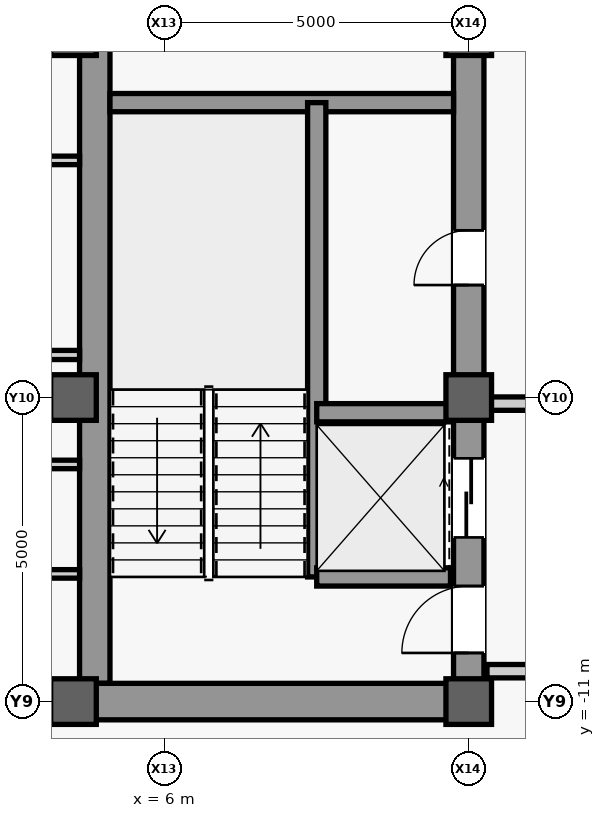
"""IFC4 building model, lengths in metres.
Left out: names, types, materials, properties, quantities, classifications, styles, units other than length and angle.
Written with IfcOpenShell. Run it as: python <this file> out.ifc"""

import sys

from ifc_helpers import new_model, si_unit, direction, frame, frame_2d, origin, origin_2d, place, context, subcontext, project, spatial, rectangle, extrude, source, transform, mapped, element, fill, save


model = new_model("IFC4")
c1 = context("Model", 3, precision=1e-05, world=origin(), true_north=direction((0.0, 1.0)))
c2 = subcontext(c1, "Body", "Model", "MODEL_VIEW")
j1 = project(units=[si_unit("LENGTHUNIT", "METRE"), si_unit("PLANEANGLEUNIT", "RADIAN")], contexts=[c1])
p1 = place(None, origin())
s1 = spatial("IfcSite", under=j1, at=p1, CompositionType="ELEMENT")
p2 = place(p1, origin())
s2 = spatial("IfcBuilding", under=s1, at=p2, CompositionType="ELEMENT")
p3 = place(p2, frame((0.0, 0.0, 317.5)))
s3 = spatial("IfcBuildingStorey", under=s2, at=p3, CompositionType="ELEMENT", Elevation=317.5)
m1 = source(origin(), c2, "Body", "SweptSolid", [
    extrude(rectangle(XDim=22.0, YDim=0.5, at=frame_2d((11.0, 0.0))), origin(), (0.0, 0.0, 1.0), 3.78),
])
p4 = place(p3, frame((11.0, -11.0, 0.0), z_axis=(0.0, 0.0, 1.0), x_axis=(0.0, 1.0, 0.0)))
e1 = element("IfcWall", 1, at=p4, inside=s3, PredefinedType="SHEAR", context=c2, shape_type="MappedRepresentation", body=[
    mapped(m1, transform((0.0, 0.0, 0.0), scale=1.0)),
])
m2 = source(origin(), c2, "Body", "SweptSolid", [
    extrude(rectangle(XDim=1.1, YDim=2.2, at=frame_2d((0.55, 1.1))), frame((0.0, 0.26, 0.0), z_axis=(0.0, -1.0, 0.0), x_axis=(1.0, 0.0, 0.0)), (0.0, 0.0, 1.0), 0.52),
])
p5 = place(p4, frame((0.8, 0.0, 0.0)))
e2 = element("IfcOpeningElement", 2, at=p5, cuts=e1, PredefinedType="OPENING", context=c2, shape_type="MappedRepresentation", body=[
    mapped(m2, transform((0.0, 0.0, 0.0), scale=1.0)),
])
m3 = source(origin(), c2, "Body", "SweptSolid", [
    extrude(rectangle(XDim=0.9, YDim=2.15, at=frame_2d((0.45, 1.075))), frame((0.0, 0.26, 0.0), z_axis=(0.0, -1.0, 0.0), x_axis=(1.0, 0.0, 0.0)), (0.0, 0.0, 1.0), 0.52),
])
p6 = place(p4, frame((6.85, 0.0, 0.0)))
e3 = element("IfcOpeningElement", 3, at=p6, cuts=e1, PredefinedType="OPENING", context=c2, shape_type="MappedRepresentation", body=[
    mapped(m3, transform((0.0, 0.0, 0.0), scale=1.0)),
])
m4 = source(origin(), c2, "Body", "SweptSolid", [
    extrude(rectangle(XDim=1.2, YDim=2.3, at=frame_2d((0.6, 1.15))), frame((0.0, 0.26, 0.0), z_axis=(0.0, -1.0, 0.0), x_axis=(1.0, 0.0, 0.0)), (0.0, 0.0, 1.0), 0.52),
])
p7 = place(p4, frame((17.6, 0.0, 0.0)))
e4 = element("IfcOpeningElement", 4, at=p7, cuts=e1, PredefinedType="OPENING", context=c2, shape_type="MappedRepresentation", body=[
    mapped(m4, transform((0.0, 0.0, 0.0), scale=1.0)),
])
p8 = place(p4, frame((19.6, 0.0, 0.0)))
e5 = element("IfcOpeningElement", 5, at=p8, cuts=e1, PredefinedType="OPENING", context=c2, shape_type="MappedRepresentation", body=[
    mapped(m4, transform((0.0, 0.0, 0.0), scale=1.0)),
])
m5 = source(origin(), c2, "Body", "SweptSolid", [
    extrude(rectangle(XDim=1.3, YDim=2.3, at=frame_2d((0.65, 1.15))), frame((0.0, 0.26, 0.0), z_axis=(0.0, -1.0, 0.0), x_axis=(1.0, 0.0, 0.0)), (0.0, 0.0, 1.0), 0.52),
])
p9 = place(p4, frame((2.7, 0.0, 0.0)))
e6 = element("IfcOpeningElement", 6, at=p9, cuts=e1, PredefinedType="OPENING", context=c2, shape_type="MappedRepresentation", body=[
    mapped(m5, transform((0.0, 0.0, 0.0), scale=1.0)),
])
p10 = place(p4, frame((13.35, 0.0, 0.0)))
e7 = element("IfcOpeningElement", 7, at=p10, cuts=e1, PredefinedType="OPENING", context=c2, shape_type="MappedRepresentation", body=[
    mapped(m5, transform((0.0, 0.0, 0.0), scale=1.0)),
])
m6 = source(origin(), c2, "Body", "SweptSolid", [
    extrude(rectangle(XDim=21.4, YDim=0.5, at=frame_2d((10.7, 0.0))), origin(), (0.0, 0.0, 1.0), 3.78),
])
p11 = place(p3, frame((4.85, -10.7, 0.0), z_axis=(0.0, 0.0, 1.0), x_axis=(0.0, 1.0, 0.0)))
e8 = element("IfcWall", 8, at=p11, inside=s3, PredefinedType="SHEAR", context=c2, shape_type="MappedRepresentation", body=[
    mapped(m6, transform((0.0, 0.0, 0.0), scale=1.0)),
])
m7 = source(origin(), c2, "Body", "SweptSolid", [
    extrude(rectangle(XDim=5.9, YDim=0.6, at=frame_2d((2.95, 0.0))), origin(), (0.0, 0.0, 1.0), 3.78),
])
p12 = place(p3, frame((4.85, -11.0, 0.0), z_axis=(0.0, 0.0, 1.0), x_axis=(1.0, 0.0, 0.0)))
e9 = element("IfcWall", 9, at=p12, inside=s3, PredefinedType="SHEAR", context=c2, shape_type="MappedRepresentation", body=[
    mapped(m7, transform((0.0, 0.0, 0.0), scale=1.0)),
])
m8 = source(origin(), c2, "Body", "SweptSolid", [
    extrude(rectangle(XDim=5.65, YDim=0.3, at=frame_2d((2.825, 0.0))), origin(), (0.0, 0.0, 1.0), 3.78),
])
p13 = place(p3, frame((5.1, -1.15, 0.0), z_axis=(0.0, 0.0, 1.0), x_axis=(1.0, 0.0, 0.0)))
e10 = element("IfcWall", 10, at=p13, inside=s3, PredefinedType="SHEAR", context=c2, shape_type="MappedRepresentation", body=[
    mapped(m8, transform((0.0, 0.0, 0.0), scale=1.0)),
])
m9 = source(origin(), c2, "Body", "SweptSolid", [
    extrude(rectangle(XDim=9.2, YDim=0.5, at=frame_2d((4.6, 0.0))), origin(), (0.0, 0.0, 1.0), 3.78),
])
p14 = place(p3, frame((-4.6, -11.0, 0.0), z_axis=(0.0, 0.0, 1.0), x_axis=(1.0, 0.0, 0.0)))
e11 = element("IfcWall", 11, at=p14, inside=s3, PredefinedType="SHEAR", context=c2, shape_type="MappedRepresentation", body=[
    mapped(m9, transform((0.0, 0.0, 0.0), scale=1.0)),
])
m10 = source(origin(), c2, "Body", "SweptSolid", [
    extrude(rectangle(XDim=1.8, YDim=2.25, at=frame_2d((0.9, 1.125))), frame((0.0, 0.26, 0.0), z_axis=(0.0, -1.0, 0.0), x_axis=(1.0, 0.0, 0.0)), (0.0, 0.0, 1.0), 0.52),
])
p15 = place(p14, frame((3.7, 0.0, 0.0)))
e12 = element("IfcOpeningElement", 12, at=p15, cuts=e11, PredefinedType="OPENING", context=c2, shape_type="MappedRepresentation", body=[
    mapped(m10, transform((0.0, 0.0, 0.0), scale=1.0)),
])
m11 = source(origin(), c2, "Body", "SweptSolid", [
    extrude(rectangle(XDim=0.75, YDim=0.75, at=origin_2d()), origin(), (0.0, 0.0, 1.0), 4.0),
])
for number, where, z_axis, x_axis in (
    (13, (4.5, -11.0, 0.0), (0.0, 0.0, 1.0), (1.0, 0.0, 0.0)),
    (14, (4.5, -6.0, 0.0), (0.0, 0.0, 1.0), (1.0, 0.0, 0.0)),
    (15, (4.5, 0.0, 0.0), (0.0, 0.0, 1.0), (1.0, 0.0, 0.0)),
    (16, (11.0, -11.0, 0.0), (0.0, 0.0, 1.0), (1.0, 0.0, 0.0)),
    (17, (11.0, -6.0, 0.0), (0.0, 0.0, 1.0), (1.0, 0.0, 0.0)),
    (18, (11.0, 0.0, 0.0), (0.0, 0.0, 1.0), (1.0, 0.0, 0.0)),
):
    element("IfcColumn", number, at=place(p3, frame(where, z_axis=z_axis, x_axis=x_axis)), inside=s3, PredefinedType="COLUMN", context=c2, shape_type="MappedRepresentation", body=[
        mapped(m11, transform((0.0, 0.0, 0.0), scale=1.0)),
    ])
m12 = source(origin(), c2, "Body", "SweptSolid", [
    extrude(rectangle(XDim=7.8, YDim=0.3, at=frame_2d((3.9, 0.0))), origin(), (0.0, 0.0, 1.0), 3.78),
])
p16 = place(p3, frame((8.5, -8.95, 0.0), z_axis=(0.0, 0.0, 1.0), x_axis=(0.0, 1.0, 0.0)))
e19 = element("IfcWall", 19, at=p16, inside=s3, PredefinedType="SHEAR", context=c2, shape_type="MappedRepresentation", body=[
    mapped(m12, transform((0.0, 0.0, 0.0), scale=1.0)),
])
m13 = source(origin(), c2, "Body", "SweptSolid", [
    extrude(rectangle(XDim=2.2, YDim=0.3, at=frame_2d((1.1, 0.0))), origin(), (0.0, 0.0, 1.0), 3.78),
])
for number, where, z_axis, x_axis in (
    (20, (8.5, -8.95, 0.0), (0.0, 0.0, 1.0), (1.0, 0.0, 0.0)),
    (21, (8.5, -6.25, 0.0), (0.0, 0.0, 1.0), (1.0, 0.0, 0.0)),
):
    element("IfcWall", number, at=place(p3, frame(where, z_axis=z_axis, x_axis=x_axis)), inside=s3, PredefinedType="SHEAR", context=c2, shape_type="MappedRepresentation", body=[
        mapped(m13, transform((0.0, 0.0, 0.0), scale=1.0)),
    ])
m14 = source(origin(), c2, "Body", "SweptSolid", [
    extrude(rectangle(XDim=4.05, YDim=0.22, at=frame_2d((2.025, 0.0))), origin(), (0.0, 0.0, 1.0), 3.78),
])
p17 = place(p3, frame((11.3, -10.5, 0.0), z_axis=(0.0, 0.0, 1.0), x_axis=(1.0, 0.0, 0.0)))
e22 = element("IfcWall", 22, at=p17, inside=s3, PredefinedType="PARTITIONING", context=c2, shape_type="MappedRepresentation", body=[
    mapped(m14, transform((0.0, 0.0, 0.0), scale=1.0)),
])
m15 = source(origin(), c2, "Body", "SweptSolid", [
    extrude(rectangle(XDim=4.05, YDim=0.22, at=frame_2d((2.025, 0.0))), origin(), (0.0, 0.0, 1.0), 3.085),
])
p18 = place(p3, frame((11.3, -6.1, 0.0), z_axis=(0.0, 0.0, 1.0), x_axis=(1.0, 0.0, 0.0)))
e23 = element("IfcWall", 23, at=p18, inside=s3, PredefinedType="PARTITIONING", context=c2, shape_type="MappedRepresentation", body=[
    mapped(m15, transform((0.0, 0.0, 0.0), scale=1.0)),
])
m16 = source(origin(), c2, "Body", "SweptSolid", [
    extrude(rectangle(XDim=3.45, YDim=0.14, at=frame_2d((1.725, 0.0))), origin(), (0.0, 0.0, 1.0), 3.78),
])
for number, where, z_axis, x_axis in (
    (24, (1.15, -8.9, 0.0), (0.0, 0.0, 1.0), (1.0, 0.0, 0.0)),
    (25, (1.15, -7.1, 0.0), (0.0, 0.0, 1.0), (1.0, 0.0, 0.0)),
):
    element("IfcWall", number, at=place(p3, frame(where, z_axis=z_axis, x_axis=x_axis)), inside=s3, PredefinedType="PARTITIONING", context=c2, shape_type="MappedRepresentation", body=[
        mapped(m16, transform((0.0, 0.0, 0.0), scale=1.0)),
    ])
m17 = source(origin(), c2, "Body", "SweptSolid", [
    extrude(rectangle(XDim=3.45, YDim=0.15, at=frame_2d((1.725, 0.0))), origin(), (0.0, 0.0, 1.0), 3.78),
])
p19 = place(p3, frame((1.15, -5.3, 0.0), z_axis=(0.0, 0.0, 1.0), x_axis=(1.0, 0.0, 0.0)))
e26 = element("IfcWall", 26, at=p19, inside=s3, PredefinedType="PARTITIONING", context=c2, shape_type="MappedRepresentation", body=[
    mapped(m17, transform((0.0, 0.0, 0.0), scale=1.0)),
])
p20 = place(p3, frame((1.15, -2.1, 0.0), z_axis=(0.0, 0.0, 1.0), x_axis=(1.0, 0.0, 0.0)))
e27 = element("IfcWall", 27, at=p20, inside=s3, PredefinedType="PARTITIONING", context=c2, shape_type="MappedRepresentation", body=[
    mapped(m16, transform((0.0, 0.0, 0.0), scale=1.0)),
])
m18 = source(origin(), c2, "Body", "SweptSolid", [
    extrude(rectangle(XDim=1.1, YDim=2.2, at=frame_2d((0.55, 1.1))), frame((0.0, 0.025, 0.0), z_axis=(0.0, -1.0, 0.0), x_axis=(1.0, 0.0, 0.0)), (0.0, 0.0, 1.0), 0.05),
])
p21 = place(p5, origin())
e28 = element("IfcDoor", 28, at=p21, inside=s3, OperationType="SINGLE_SWING_LEFT", PredefinedType="DOOR", context=c2, shape_type="MappedRepresentation", body=[
    mapped(m18, transform((0.0, 0.0, 0.0), scale=1.0)),
])
fill(e2, e28)
m19 = source(origin(), c2, "Body", "SweptSolid", [
    extrude(rectangle(XDim=0.9, YDim=2.15, at=frame_2d((0.45, 1.075))), frame((0.0, 0.025, 0.0), z_axis=(0.0, -1.0, 0.0), x_axis=(1.0, 0.0, 0.0)), (0.0, 0.0, 1.0), 0.05),
])
p22 = place(p6, origin())
e29 = element("IfcDoor", 29, at=p22, inside=s3, OperationType="SINGLE_SWING_LEFT", PredefinedType="DOOR", context=c2, shape_type="MappedRepresentation", body=[
    mapped(m19, transform((0.0, 0.0, 0.0), scale=1.0)),
])
fill(e3, e29)
m20 = source(origin(), c2, "Body", "SweptSolid", [
    extrude(rectangle(XDim=1.3, YDim=2.3, at=frame_2d((0.65, 1.15))), frame((0.0, 0.025, 0.0), z_axis=(0.0, -1.0, 0.0), x_axis=(1.0, 0.0, 0.0)), (0.0, 0.0, 1.0), 0.05),
])
p23 = place(p9, origin())
e30 = element("IfcDoor", 30, at=p23, inside=s3, OperationType="SLIDING_TO_LEFT", PredefinedType="DOOR", context=c2, shape_type="MappedRepresentation", body=[
    mapped(m20, transform((0.0, 0.0, 0.0), scale=1.0)),
])
fill(e6, e30)
save(model, sys.argv[1])
